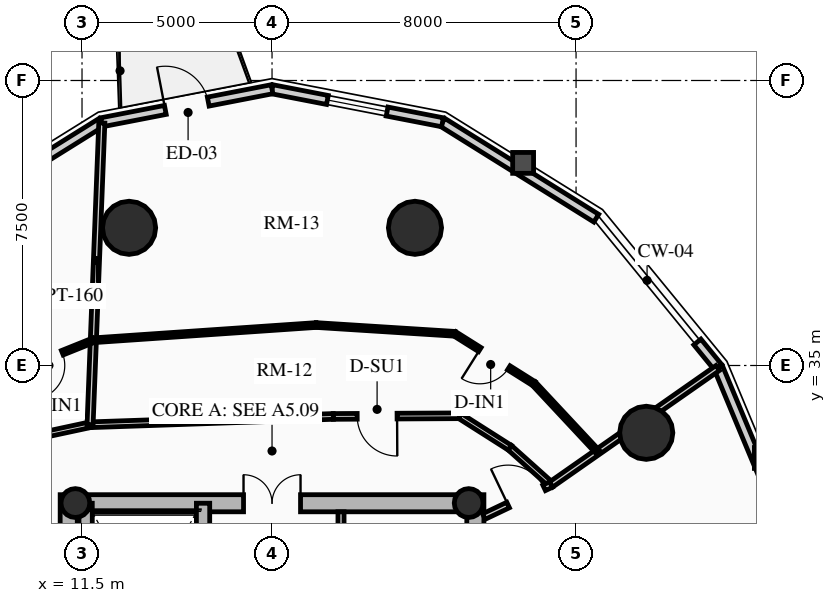
"""IFC4 building model, lengths in metres.
Left out: names, types, materials, properties, quantities, classifications, styles, units other than length and angle.
Written with IfcOpenShell. Run it as: python <this file> out.ifc"""

import sys

from ifc_helpers import new_model, si_unit, direction, frame, frame_2d, origin, origin_2d, place, context, subcontext, project, spatial, rectangle, circle, hollow_circle, extrude, source, transform, mapped, element, fill, save


model = new_model("IFC4")
c1 = context("Model", 3, precision=1e-05, world=origin(), true_north=direction((0.0, 1.0)))
c2 = subcontext(c1, "Body", "Model", "MODEL_VIEW")
j1 = project(units=[si_unit("LENGTHUNIT", "METRE"), si_unit("PLANEANGLEUNIT", "RADIAN")], contexts=[c1])
p1 = place(None, origin())
s1 = spatial("IfcSite", under=j1, at=p1, CompositionType="ELEMENT")
p2 = place(p1, origin())
s2 = spatial("IfcBuilding", under=s1, at=p2, CompositionType="ELEMENT")
p3 = place(p2, frame((0.0, 0.0, 144.04)))
s3 = spatial("IfcBuildingStorey", under=s2, at=p3, CompositionType="ELEMENT", Elevation=144.04)
for number, where, z_axis, x_axis in (
    (1, (11.15, 17.4, 0.0), (0.0, 0.0, 1.0), (0.0, 1.0, 0.0)),
    (2, (21.85, 17.4, 0.0), (0.0, 0.0, 1.0), (0.0, 1.0, 0.0)),
):
    element("IfcWall", number, at=place(p3, frame(where, z_axis=z_axis, x_axis=x_axis)), inside=s3, PredefinedType="SHEAR", context=c2, shape_type="SweptSolid", body=[
        extrude(rectangle(XDim=14.2, YDim=0.45, at=frame_2d((7.1, 0.0))), origin(), (0.0, 0.0, 1.0), 3.06),
    ])
p4 = place(p3, frame((11.15, 31.375, 0.0), z_axis=(0.0, 0.0, 1.0), x_axis=(1.0, 0.0, 0.0)))
e3 = element("IfcWall", 3, at=p4, inside=s3, PredefinedType="SHEAR", context=c2, shape_type="SweptSolid", body=[
    extrude(rectangle(XDim=10.7, YDim=0.45, at=frame_2d((5.35, 0.0))), origin(), (0.0, 0.0, 1.0), 3.06),
])
m1 = source(origin(), c2, "Body", "SweptSolid", [
    extrude(rectangle(XDim=1.5, YDim=2.02, at=frame_2d((0.75, 1.01))), frame((0.0, 0.235, 0.0), z_axis=(0.0, -1.0, 0.0), x_axis=(1.0, 0.0, 0.0)), (0.0, 0.0, 1.0), 0.47),
])
p5 = place(p4, frame((4.6, 0.0, 0.0)))
e4 = element("IfcOpeningElement", 4, at=p5, cuts=e3, PredefinedType="OPENING", context=c2, shape_type="MappedRepresentation", body=[
    mapped(m1, transform((0.0, 0.0, 0.0), x_axis=(1.0, 0.0, 0.0), y_axis=(0.0, 1.0, 0.0), z_axis=(0.0, 0.0, 1.0), scale=1.0)),
])
p6 = place(p3, frame((14.685, 17.625, 0.0), z_axis=(0.0, 0.0, 1.0), x_axis=(0.0, 1.0, 0.0)))
e5 = element("IfcWall", 5, at=p6, inside=s3, PredefinedType="SHEAR", context=c2, shape_type="SweptSolid", body=[
    extrude(rectangle(XDim=13.75, YDim=0.35, at=frame_2d((6.875, 0.0))), origin(), (0.0, 0.0, 1.0), 3.06),
])
m2 = source(origin(), c2, "Body", "SweptSolid", [
    extrude(rectangle(XDim=1.1, YDim=2.015, at=frame_2d((0.55, 1.007))), frame((0.0, 0.185, 0.0), z_axis=(0.0, -1.0, 0.0), x_axis=(1.0, 0.0, 0.0)), (0.0, 0.0, 1.0), 0.37),
])
p7 = place(p6, frame((4.875, 0.0, 0.0)))
e6 = element("IfcOpeningElement", 6, at=p7, cuts=e5, PredefinedType="OPENING", context=c2, shape_type="MappedRepresentation", body=[
    mapped(m2, transform((0.0, 0.0, 0.0), x_axis=(1.0, 0.0, 0.0), y_axis=(0.0, 1.0, 0.0), z_axis=(0.0, 0.0, 1.0), scale=1.0)),
])
p8 = place(p6, frame((0.65, 0.0, 0.0)))
e7 = element("IfcOpeningElement", 7, at=p8, cuts=e5, PredefinedType="OPENING", context=c2, shape_type="MappedRepresentation", body=[
    mapped(m2, transform((0.0, 0.0, 0.0), x_axis=(1.0, 0.0, 0.0), y_axis=(0.0, 1.0, 0.0), z_axis=(0.0, 0.0, 1.0), scale=1.0)),
])
p9 = place(p6, frame((2.65, 0.0, 0.0)))
e8 = element("IfcOpeningElement", 8, at=p9, cuts=e5, PredefinedType="OPENING", context=c2, shape_type="MappedRepresentation", body=[
    mapped(m2, transform((0.0, 0.0, 0.0), x_axis=(1.0, 0.0, 0.0), y_axis=(0.0, 1.0, 0.0), z_axis=(0.0, 0.0, 1.0), scale=1.0)),
])
m3 = source(origin(), c2, "Body", "SweptSolid", [
    extrude(rectangle(XDim=1.15, YDim=2.02, at=frame_2d((0.575, 1.01))), frame((0.0, 0.185, 0.0), z_axis=(0.0, -1.0, 0.0), x_axis=(1.0, 0.0, 0.0)), (0.0, 0.0, 1.0), 0.37),
])
p10 = place(p6, frame((7.295, 0.0, 0.0)))
e9 = element("IfcOpeningElement", 9, at=p10, cuts=e5, PredefinedType="OPENING", context=c2, shape_type="MappedRepresentation", body=[
    mapped(m3, transform((0.0, 0.0, 0.0), x_axis=(1.0, 0.0, 0.0), y_axis=(0.0, 1.0, 0.0), z_axis=(0.0, 0.0, 1.0), scale=1.0)),
])
p11 = place(p3, frame((11.595, 24.655, 0.0), z_axis=(0.0, 0.0, 1.0), x_axis=(0.0, 1.0, 0.0)))
e10 = element("IfcWall", 10, at=p11, inside=s3, PredefinedType="SHEAR", context=c2, shape_type="SweptSolid", body=[
    extrude(rectangle(XDim=6.72, YDim=0.35, at=frame_2d((3.36, 0.0))), origin(), (0.0, 0.0, 1.0), 3.06),
])
for number, where, z_axis, x_axis in (
    (11, (11.325, 31.38, 0.0), (0.0, 0.0, 1.0), (1.0, 0.0, 0.0)),
    (12, (21.675, 31.38, 0.0), (0.0, 0.0, 1.0), (1.0, 0.0, 0.0)),
):
    element("IfcColumn", number, at=place(p3, frame(where, z_axis=z_axis, x_axis=x_axis)), inside=s3, PredefinedType="COLUMN", context=c2, shape_type="SweptSolid", body=[
        extrude(hollow_circle(Radius=0.38, WallThickness=0.032, at=origin_2d()), origin(), (0.0, 0.0, 1.0), 3.06),
    ])
for number, where, z_axis, x_axis in (
    (13, (26.347, 33.229, 0.0), (0.0, 0.0, 1.0), (1.0, 0.0, 0.0)),
    (14, (20.261, 38.623, 0.0), (0.0, 0.0, 1.0), (1.0, 0.0, 0.0)),
    (15, (12.739, 38.623, 0.0), (0.0, 0.0, 1.0), (1.0, 0.0, 0.0)),
):
    element("IfcColumn", number, at=place(p3, frame(where, z_axis=z_axis, x_axis=x_axis)), inside=s3, PredefinedType="USERDEFINED", context=c2, shape_type="SweptSolid", body=[
        extrude(circle(Radius=0.7, at=origin_2d()), origin(), (0.0, 0.0, 1.0), 3.06),
    ])
p12 = place(p3, frame((28.243, 34.945, 0.0), z_axis=(0.0, 0.0, 1.0), x_axis=(0.384259959969, -0.923224936386, 0.0)))
e16 = element("IfcWall", 16, at=p12, inside=s3, PredefinedType="SOLIDWALL", context=c2, shape_type="SweptSolid", body=[
    extrude(rectangle(XDim=5.365, YDim=0.24, at=frame_2d((2.683, 0.0))), origin(), (0.0, 0.0, 1.0), 2.229),
])
p13 = place(p3, frame((27.692, 35.619, 0.0), z_axis=(0.0, 0.0, 1.0), x_axis=(0.632702874536, -0.774394649099, 0.0)))
e17 = element("IfcWall", 17, at=p13, inside=s3, PredefinedType="SOLIDWALL", context=c2, shape_type="SweptSolid", body=[
    extrude(rectangle(XDim=0.87, YDim=0.24, at=frame_2d((0.435, 0.0))), origin(), (0.0, 0.0, 1.0), 2.229),
])
p14 = place(p3, frame((20.985, 41.4, 0.0), z_axis=(0.0, 0.0, 1.0), x_axis=(0.848452391194, -0.529271707044, 0.0)))
e18 = element("IfcWall", 18, at=p14, inside=s3, PredefinedType="SOLIDWALL", context=c2, shape_type="SweptSolid", body=[
    extrude(rectangle(XDim=4.769, YDim=0.24, at=frame_2d((2.385, 0.0))), origin(), (0.0, 0.0, 1.0), 2.229),
])
p15 = place(p3, frame((16.5, 42.27, 0.0), z_axis=(0.0, 0.0, 1.0), x_axis=(0.981718699963, -0.190337579429, 0.0)))
e19 = element("IfcWall", 19, at=p15, inside=s3, PredefinedType="SOLIDWALL", context=c2, shape_type="SweptSolid", body=[
    extrude(rectangle(XDim=4.569, YDim=0.24, at=frame_2d((2.284, 0.0))), origin(), (0.0, 0.0, 1.0), 2.229),
])
m4 = source(origin(), c2, "Body", "SweptSolid", [
    extrude(rectangle(XDim=1.6, YDim=1.3, at=frame_2d((0.8, 0.65))), frame((0.0, 0.13, 0.0), z_axis=(0.0, -1.0, 0.0), x_axis=(1.0, 0.0, 0.0)), (0.0, 0.0, 1.0), 0.26),
])
p16 = place(p15, frame((1.484, 0.0, 0.65)))
e20 = element("IfcOpeningElement", 20, at=p16, cuts=e19, PredefinedType="OPENING", context=c2, shape_type="MappedRepresentation", body=[
    mapped(m4, transform((0.0, 0.0, 0.0), x_axis=(1.0, 0.0, 0.0), y_axis=(0.0, 1.0, 0.0), z_axis=(0.0, 0.0, 1.0), scale=1.0)),
])
p17 = place(p3, frame((12.015, 41.4, 0.0), z_axis=(0.0, 0.0, 1.0), x_axis=(0.981718699963, 0.190337579429, 0.0)))
e21 = element("IfcWall", 21, at=p17, inside=s3, PredefinedType="SOLIDWALL", context=c2, shape_type="SweptSolid", body=[
    extrude(rectangle(XDim=4.569, YDim=0.24, at=frame_2d((2.284, 0.0))), origin(), (0.0, 0.0, 1.0), 2.229),
])
m5 = source(origin(), c2, "Body", "SweptSolid", [
    extrude(rectangle(XDim=1.15, YDim=2.005, at=frame_2d((0.575, 1.002))), frame((0.0, 0.13, 0.0), z_axis=(0.0, -1.0, 0.0), x_axis=(1.0, 0.0, 0.0)), (0.0, 0.0, 1.0), 0.26),
])
p18 = place(p17, frame((1.709, 0.0, 0.0)))
e22 = element("IfcOpeningElement", 22, at=p18, cuts=e21, PredefinedType="OPENING", context=c2, shape_type="MappedRepresentation", body=[
    mapped(m5, transform((0.0, 0.0, 0.0), x_axis=(1.0, 0.0, 0.0), y_axis=(0.0, 1.0, 0.0), z_axis=(0.0, 0.0, 1.0), scale=1.0)),
])
p19 = place(p3, frame((7.968, 38.876, 0.0), z_axis=(0.0, 0.0, 1.0), x_axis=(0.848452391194, 0.529271707044, 0.0)))
e23 = element("IfcWall", 23, at=p19, inside=s3, PredefinedType="SOLIDWALL", context=c2, shape_type="SweptSolid", body=[
    extrude(rectangle(XDim=4.769, YDim=0.24, at=frame_2d((2.385, 0.0))), origin(), (0.0, 0.0, 1.0), 2.229),
])
p20 = place(p3, frame((18.315, 27.25, 0.0), z_axis=(0.0, 0.0, 1.0), x_axis=(0.0, 1.0, 0.0)))
e24 = element("IfcWall", 24, at=p20, inside=s3, PredefinedType="PARTITIONING", context=c2, shape_type="SweptSolid", body=[
    extrude(rectangle(XDim=3.9, YDim=0.16, at=frame_2d((1.95, 0.0))), origin(), (0.0, 0.0, 1.0), 2.705),
])
m6 = source(origin(), c2, "Body", "SweptSolid", [
    extrude(rectangle(XDim=0.9, YDim=2.005, at=frame_2d((0.45, 1.002))), frame((0.0, 0.09, 0.0), z_axis=(0.0, -1.0, 0.0), x_axis=(1.0, 0.0, 0.0)), (0.0, 0.0, 1.0), 0.18),
])
p21 = place(p20, frame((0.55, 0.0, 0.0)))
e25 = element("IfcOpeningElement", 25, at=p21, cuts=e24, PredefinedType="OPENING", context=c2, shape_type="MappedRepresentation", body=[
    mapped(m6, transform((0.0, 0.0, 0.0), x_axis=(1.0, 0.0, 0.0), y_axis=(0.0, 1.0, 0.0), z_axis=(0.0, 0.0, 1.0), scale=1.0)),
])
p22 = place(p20, frame((2.35, 0.0, 0.0)))
e26 = element("IfcOpeningElement", 26, at=p22, cuts=e24, PredefinedType="OPENING", context=c2, shape_type="MappedRepresentation", body=[
    mapped(m6, transform((0.0, 0.0, 0.0), x_axis=(1.0, 0.0, 0.0), y_axis=(0.0, 1.0, 0.0), z_axis=(0.0, 0.0, 1.0), scale=1.0)),
])
p23 = place(p3, frame((23.841, 31.866, 0.0), z_axis=(0.0, 0.0, 1.0), x_axis=(-0.74511843306, 0.666932171, 0.0)))
e27 = element("IfcWall", 27, at=p23, inside=s3, PredefinedType="PARTITIONING", context=c2, shape_type="SweptSolid", body=[
    extrude(rectangle(XDim=1.455, YDim=0.15, at=frame_2d((0.728, 0.0))), origin(), (0.0, 0.0, 1.0), 2.275),
])
p24 = place(p3, frame((22.756, 32.836, 0.0), z_axis=(0.0, 0.0, 1.0), x_axis=(-0.843828401801, 0.536613108593, 0.0)))
e28 = element("IfcWall", 28, at=p24, inside=s3, PredefinedType="PARTITIONING", context=c2, shape_type="SweptSolid", body=[
    extrude(rectangle(XDim=1.565, YDim=0.15, at=frame_2d((0.783, 0.0))), origin(), (0.0, 0.0, 1.0), 2.275),
])
p25 = place(p3, frame((21.435, 33.677, 0.0), z_axis=(0.0, 0.0, 1.0), x_axis=(-0.999986775557, -0.005142831114, 0.0)))
e29 = element("IfcWall", 29, at=p25, inside=s3, PredefinedType="PARTITIONING", context=c2, shape_type="SweptSolid", body=[
    extrude(rectangle(XDim=3.323, YDim=0.15, at=frame_2d((1.662, 0.0))), origin(), (0.0, 0.0, 1.0), 2.275),
])
m7 = source(origin(), c2, "Body", "SweptSolid", [
    extrude(rectangle(XDim=1.05, YDim=2.015, at=frame_2d((0.525, 1.007))), frame((0.0, 0.085, 0.0), z_axis=(0.0, -1.0, 0.0), x_axis=(1.0, 0.0, 0.0)), (0.0, 0.0, 1.0), 0.17),
])
p26 = place(p25, frame((1.645, 0.0, 0.0)))
e30 = element("IfcOpeningElement", 30, at=p26, cuts=e29, PredefinedType="OPENING", context=c2, shape_type="MappedRepresentation", body=[
    mapped(m7, transform((0.0, 0.0, 0.0), x_axis=(1.0, 0.0, 0.0), y_axis=(0.0, 1.0, 0.0), z_axis=(0.0, 0.0, 1.0), scale=1.0)),
])
p27 = place(p3, frame((18.112, 33.659, 0.0), z_axis=(0.0, 0.0, 1.0), x_axis=(-0.999413895918, -0.034232508622, 0.0)))
e31 = element("IfcWall", 31, at=p27, inside=s3, PredefinedType="PARTITIONING", context=c2, shape_type="SweptSolid", body=[
    extrude(rectangle(XDim=6.404, YDim=0.15, at=frame_2d((3.202, 0.0))), origin(), (0.0, 0.0, 1.0), 2.275),
])
p28 = place(p3, frame((11.712, 33.44, 0.0), z_axis=(0.0, 0.0, 1.0), x_axis=(-0.977753514213, -0.209757158265, 0.0)))
e32 = element("IfcWall", 32, at=p28, inside=s3, PredefinedType="PARTITIONING", context=c2, shape_type="SweptSolid", body=[
    extrude(rectangle(XDim=1.901, YDim=0.15, at=frame_2d((0.95, 0.0))), origin(), (0.0, 0.0, 1.0), 2.275),
])
p29 = place(p3, frame((23.841, 31.866, 0.0), z_axis=(0.0, 0.0, 1.0), x_axis=(0.819514693563, 0.573058170724, 0.0)))
e33 = element("IfcWall", 33, at=p29, inside=s3, PredefinedType="PARTITIONING", context=c2, shape_type="SweptSolid", body=[
    extrude(rectangle(XDim=5.352, YDim=0.16, at=frame_2d((2.676, 0.0))), origin(), (0.0, 0.0, 1.0), 2.229),
])
p30 = place(p3, frame((11.712, 33.44, 0.0), z_axis=(0.0, 0.0, 1.0), x_axis=(0.038892064024, 0.999243417469, 0.0)))
e34 = element("IfcWall", 34, at=p30, inside=s3, PredefinedType="PARTITIONING", context=c2, shape_type="SweptSolid", body=[
    extrude(rectangle(XDim=7.947, YDim=0.16, at=frame_2d((3.974, 0.0))), origin(), (0.0, 0.0, 1.0), 2.229),
])
p31 = place(p3, frame((22.075, 31.025, 0.0), z_axis=(0.0, 0.0, 1.0), x_axis=(0.902802823792, 0.430054719022, 0.0)))
e35 = element("IfcWall", 35, at=p31, inside=s3, PredefinedType="PARTITIONING", context=c2, shape_type="SweptSolid", body=[
    extrude(rectangle(XDim=1.956, YDim=0.16, at=frame_2d((0.978, 0.0))), origin(), (0.0, 0.0, 1.0), 2.275),
])
m8 = source(origin(), c2, "Body", "SweptSolid", [
    extrude(rectangle(XDim=1.05, YDim=2.015, at=frame_2d((0.525, 1.007))), frame((0.0, 0.09, 0.0), z_axis=(0.0, -1.0, 0.0), x_axis=(1.0, 0.0, 0.0)), (0.0, 0.0, 1.0), 0.18),
])
p32 = place(p31, frame((0.706, 0.0, 0.0)))
e36 = element("IfcOpeningElement", 36, at=p32, cuts=e35, PredefinedType="OPENING", context=c2, shape_type="MappedRepresentation", body=[
    mapped(m8, transform((0.0, 0.0, 0.0), x_axis=(1.0, 0.0, 0.0), y_axis=(0.0, 1.0, 0.0), z_axis=(0.0, 0.0, 1.0), scale=1.0)),
])
p33 = place(p3, frame((25.069, 32.725, 0.0), z_axis=(0.0, 0.0, 1.0), x_axis=(-0.682321786461, 0.731051967865, 0.0)))
e37 = element("IfcWall", 37, at=p33, inside=s3, PredefinedType="PARTITIONING", context=c2, shape_type="SweptSolid", body=[
    extrude(rectangle(XDim=2.46, YDim=0.125, at=frame_2d((1.23, 0.0))), origin(), (0.0, 0.0, 1.0), 2.275),
])
p34 = place(p3, frame((23.39, 34.523, 0.0), z_axis=(0.0, 0.0, 1.0), x_axis=(-0.846355430711, 0.53261851724, 0.0)))
e38 = element("IfcWall", 38, at=p34, inside=s3, PredefinedType="PARTITIONING", context=c2, shape_type="SweptSolid", body=[
    extrude(rectangle(XDim=2.461, YDim=0.125, at=frame_2d((1.23, 0.0))), origin(), (0.0, 0.0, 1.0), 2.275),
])
m9 = source(origin(), c2, "Body", "SweptSolid", [
    extrude(rectangle(XDim=0.9, YDim=2.005, at=frame_2d((0.45, 1.002))), frame((0.0, 0.073, 0.0), z_axis=(0.0, -1.0, 0.0), x_axis=(1.0, 0.0, 0.0)), (0.0, 0.0, 1.0), 0.145),
])
p35 = place(p34, frame((0.781, 0.0, 0.0)))
e39 = element("IfcOpeningElement", 39, at=p35, cuts=e38, PredefinedType="OPENING", context=c2, shape_type="MappedRepresentation", body=[
    mapped(m9, transform((0.0, 0.0, 0.0), x_axis=(1.0, 0.0, 0.0), y_axis=(0.0, 1.0, 0.0), z_axis=(0.0, 0.0, 1.0), scale=1.0)),
])
p36 = place(p3, frame((21.308, 35.834, 0.0), z_axis=(0.0, 0.0, 1.0), x_axis=(-0.998000499874, 0.063206030185, 0.0)))
e40 = element("IfcWall", 40, at=p36, inside=s3, PredefinedType="PARTITIONING", context=c2, shape_type="SweptSolid", body=[
    extrude(rectangle(XDim=3.654, YDim=0.125, at=frame_2d((1.827, 0.0))), origin(), (0.0, 0.0, 1.0), 2.275),
])
p37 = place(p3, frame((17.661, 36.065, 0.0), z_axis=(0.0, 0.0, 1.0), x_axis=(-0.997670473363, -0.068217494681, 0.0)))
e41 = element("IfcWall", 41, at=p37, inside=s3, PredefinedType="PARTITIONING", context=c2, shape_type="SweptSolid", body=[
    extrude(rectangle(XDim=5.876, YDim=0.125, at=frame_2d((2.938, 0.0))), origin(), (0.0, 0.0, 1.0), 2.275),
])
p38 = place(p3, frame((11.798, 35.664, 0.0), z_axis=(0.0, 0.0, 1.0), x_axis=(-0.927779230796, -0.37312960068, 0.0)))
e42 = element("IfcWall", 42, at=p38, inside=s3, PredefinedType="PARTITIONING", context=c2, shape_type="SweptSolid", body=[
    extrude(rectangle(XDim=2.662, YDim=0.125, at=frame_2d((1.331, 0.0))), origin(), (0.0, 0.0, 1.0), 2.275),
])
p39 = place(p38, frame((0.881, 0.0, 0.0)))
e43 = element("IfcOpeningElement", 43, at=p39, cuts=e42, PredefinedType="OPENING", context=c2, shape_type="MappedRepresentation", body=[
    mapped(m9, transform((0.0, 0.0, 0.0), x_axis=(1.0, 0.0, 0.0), y_axis=(0.0, 1.0, 0.0), z_axis=(0.0, 0.0, 1.0), scale=1.0)),
])
m10 = source(origin(), c2, "Body", "SweptSolid", [
    extrude(rectangle(XDim=1.6, YDim=1.3, at=frame_2d((0.8, 0.65))), frame((0.0, 0.03, 0.0), z_axis=(0.0, -1.0, 0.0), x_axis=(1.0, 0.0, 0.0)), (0.0, 0.0, 1.0), 0.06),
])
p40 = place(p16, origin())
e44 = element("IfcWindow", 44, at=p40, inside=s3, PartitioningType="SINGLE_PANEL", PredefinedType="WINDOW", context=c2, shape_type="MappedRepresentation", body=[
    mapped(m10, transform((0.0, 0.0, 0.0), x_axis=(1.0, 0.0, 0.0), y_axis=(0.0, 1.0, 0.0), z_axis=(0.0, 0.0, 1.0), scale=1.0)),
])
fill(e20, e44)
m11 = source(origin(), c2, "Body", "SweptSolid", [
    extrude(rectangle(XDim=1.15, YDim=2.005, at=frame_2d((0.575, 1.002))), frame((0.0, 0.025, 0.0), z_axis=(0.0, -1.0, 0.0), x_axis=(1.0, 0.0, 0.0)), (0.0, 0.0, 1.0), 0.05),
])
p41 = place(p18, origin())
e45 = element("IfcDoor", 45, at=p41, inside=s3, OperationType="SINGLE_SWING_LEFT", PredefinedType="DOOR", context=c2, shape_type="MappedRepresentation", body=[
    mapped(m11, transform((0.0, 0.0, 0.0), x_axis=(1.0, 0.0, 0.0), y_axis=(0.0, 1.0, 0.0), z_axis=(0.0, 0.0, 1.0), scale=1.0)),
])
fill(e22, e45)
m12 = source(origin(), c2, "Body", "SweptSolid", [
    extrude(rectangle(XDim=1.5, YDim=2.02, at=frame_2d((0.75, 1.01))), frame((0.0, 0.025, 0.0), z_axis=(0.0, -1.0, 0.0), x_axis=(1.0, 0.0, 0.0)), (0.0, 0.0, 1.0), 0.05),
])
p42 = place(p5, origin())
e46 = element("IfcDoor", 46, at=p42, inside=s3, OperationType="DOUBLE_DOOR_SINGLE_SWING", PredefinedType="DOOR", context=c2, shape_type="MappedRepresentation", body=[
    mapped(m12, transform((0.0, 0.0, 0.0), x_axis=(1.0, 0.0, 0.0), y_axis=(0.0, 1.0, 0.0), z_axis=(0.0, 0.0, 1.0), scale=1.0)),
])
fill(e4, e46)
m13 = source(origin(), c2, "Body", "SweptSolid", [
    extrude(rectangle(XDim=1.05, YDim=2.015, at=frame_2d((0.525, 1.007))), frame((0.0, 0.025, 0.0), z_axis=(0.0, -1.0, 0.0), x_axis=(1.0, 0.0, 0.0)), (0.0, 0.0, 1.0), 0.05),
])
p43 = place(p32, origin())
e47 = element("IfcDoor", 47, at=p43, inside=s3, OperationType="SINGLE_SWING_LEFT", PredefinedType="DOOR", context=c2, shape_type="MappedRepresentation", body=[
    mapped(m13, transform((0.0, 0.0, 0.0), x_axis=(1.0, 0.0, 0.0), y_axis=(0.0, 1.0, 0.0), z_axis=(0.0, 0.0, 1.0), scale=1.0)),
])
fill(e36, e47)
p44 = place(p26, origin())
e48 = element("IfcDoor", 48, at=p44, inside=s3, OperationType="SINGLE_SWING_LEFT", PredefinedType="DOOR", context=c2, shape_type="MappedRepresentation", body=[
    mapped(m13, transform((0.0, 0.0, 0.0), x_axis=(1.0, 0.0, 0.0), y_axis=(0.0, 1.0, 0.0), z_axis=(0.0, 0.0, 1.0), scale=1.0)),
])
fill(e30, e48)
m14 = source(origin(), c2, "Body", "SweptSolid", [
    extrude(rectangle(XDim=0.9, YDim=2.005, at=frame_2d((0.45, 1.002))), frame((0.0, 0.025, 0.0), z_axis=(0.0, -1.0, 0.0), x_axis=(1.0, 0.0, 0.0)), (0.0, 0.0, 1.0), 0.05),
])
p45 = place(p35, origin())
e49 = element("IfcDoor", 49, at=p45, inside=s3, OperationType="SINGLE_SWING_RIGHT", PredefinedType="DOOR", context=c2, shape_type="MappedRepresentation", body=[
    mapped(m14, transform((0.0, 0.0, 0.0), x_axis=(1.0, 0.0, 0.0), y_axis=(0.0, 1.0, 0.0), z_axis=(0.0, 0.0, 1.0), scale=1.0)),
])
fill(e39, e49)
p46 = place(p39, origin())
e50 = element("IfcDoor", 50, at=p46, inside=s3, OperationType="SINGLE_SWING_RIGHT", PredefinedType="DOOR", context=c2, shape_type="MappedRepresentation", body=[
    mapped(m14, transform((0.0, 0.0, 0.0), x_axis=(1.0, 0.0, 0.0), y_axis=(0.0, 1.0, 0.0), z_axis=(0.0, 0.0, 1.0), scale=1.0)),
])
fill(e43, e50)
save(model, sys.argv[1])
